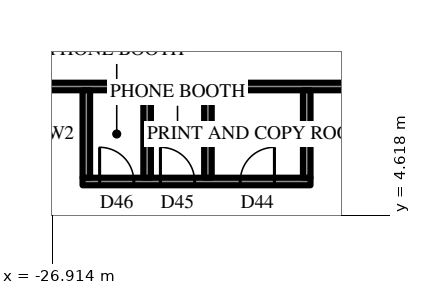
"""IFC4 building model, lengths in metres.
Left out: names, types, materials, properties, quantities, classifications, styles, units other than length and angle.
Written with IfcOpenShell. Run it as: python <this file> out.ifc"""

import sys

from ifc_helpers import new_model, si_unit, direction, frame, frame_2d, origin, place, context, subcontext, project, spatial, rectangle, extrude, element, fill, save


model = new_model("IFC4")
c1 = context("Model", 3, precision=1e-05, world=origin(), true_north=direction((0.0, 1.0)))
c2 = subcontext(c1, "Body", "Model", "MODEL_VIEW")
j1 = project(units=[si_unit("LENGTHUNIT", "METRE"), si_unit("PLANEANGLEUNIT", "RADIAN")], contexts=[c1])
p1 = place(None, origin())
s1 = spatial("IfcSite", under=j1, at=p1, CompositionType="ELEMENT")
p2 = place(p1, origin())
s2 = spatial("IfcBuilding", under=s1, at=p2, CompositionType="ELEMENT")
p3 = place(p2, frame((0.0, 0.0, 127.9)))
s3 = spatial("IfcBuildingStorey", under=s2, at=p3, CompositionType="ELEMENT", Elevation=127.9)
p4 = place(p3, frame((-18.6, 8.0, 0.0), z_axis=(0.0, 0.0, 1.0), x_axis=(-1.0, 0.0, 0.0)))
e1 = element("IfcWall", 1, at=p4, inside=s3, PredefinedType="PARTITIONING", context=c2, shape_type="SweptSolid", body=[
    extrude(rectangle(XDim=12.9, YDim=0.2, at=frame_2d((6.45, 0.0))), origin(), (0.0, 0.0, 1.0), 4.0),
])
p5 = place(p3, frame((-20.115, 5.5, 0.0), z_axis=(0.0, 0.0, 1.0), x_axis=(-1.0, 0.0, 0.0)))
e2 = element("IfcWall", 2, at=p5, inside=s3, PredefinedType="PARTITIONING", context=c2, shape_type="SweptSolid", body=[
    extrude(rectangle(XDim=6.0, YDim=0.2, at=frame_2d((3.0, 0.0))), origin(), (0.0, 0.0, 1.0), 4.0),
])
p6 = place(p5, frame((0.95, 0.0, 0.0)))
e3 = element("IfcOpeningElement", 3, at=p6, cuts=e2, PredefinedType="OPENING", context=c2, shape_type="SweptSolid", body=[
    extrude(rectangle(XDim=0.9, YDim=2.2, at=frame_2d((0.45, 1.1))), frame((0.0, 0.11, 0.0), z_axis=(0.0, -1.0, 0.0), x_axis=(1.0, 0.0, 0.0)), (0.0, 0.0, 1.0), 0.22),
])
p7 = place(p5, frame((3.05, 0.0, 0.0)))
e4 = element("IfcOpeningElement", 4, at=p7, cuts=e2, PredefinedType="OPENING", context=c2, shape_type="SweptSolid", body=[
    extrude(rectangle(XDim=0.9, YDim=2.2, at=frame_2d((0.45, 1.1))), frame((0.0, 0.11, 0.0), z_axis=(0.0, -1.0, 0.0), x_axis=(1.0, 0.0, 0.0)), (0.0, 0.0, 1.0), 0.22),
])
p8 = place(p5, frame((4.65, 0.0, 0.0)))
e5 = element("IfcOpeningElement", 5, at=p8, cuts=e2, PredefinedType="OPENING", context=c2, shape_type="SweptSolid", body=[
    extrude(rectangle(XDim=0.9, YDim=2.2, at=frame_2d((0.45, 1.1))), frame((0.0, 0.11, 0.0), z_axis=(0.0, -1.0, 0.0), x_axis=(1.0, 0.0, 0.0)), (0.0, 0.0, 1.0), 0.22),
])
for number, where, z_axis, x_axis in (
    (6, (-20.215, 7.9, 0.0), (0.0, 0.0, 1.0), (0.0, -1.0, 0.0)),
    (7, (-22.815, 7.9, 0.0), (0.0, 0.0, 1.0), (0.0, -1.0, 0.0)),
    (8, (-24.415, 7.9, 0.0), (0.0, 0.0, 1.0), (0.0, -1.0, 0.0)),
    (9, (-26.015, 7.9, 0.0), (0.0, 0.0, 1.0), (0.0, -1.0, 0.0)),
):
    element("IfcWall", number, at=place(p3, frame(where, z_axis=z_axis, x_axis=x_axis)), inside=s3, PredefinedType="PARTITIONING", context=c2, shape_type="SweptSolid", body=[
        extrude(rectangle(XDim=2.3, YDim=0.2, at=frame_2d((1.15, 0.0))), origin(), (0.0, 0.0, 1.0), 4.0),
    ])
p9 = place(p6, frame((0.9, 0.0, 0.0), z_axis=(0.0, 0.0, 1.0), x_axis=(-1.0, 0.0, 0.0)))
e10 = element("IfcDoor", 10, at=p9, inside=s3, OperationType="SINGLE_SWING_LEFT", PredefinedType="DOOR", context=c2, shape_type="SweptSolid", body=[
    extrude(rectangle(XDim=0.9, YDim=2.2, at=frame_2d((0.45, 1.1))), frame((0.0, 0.025, 0.0), z_axis=(0.0, -1.0, 0.0), x_axis=(1.0, 0.0, 0.0)), (0.0, 0.0, 1.0), 0.05),
])
fill(e3, e10)
p10 = place(p7, frame((0.9, 0.0, 0.0), z_axis=(0.0, 0.0, 1.0), x_axis=(-1.0, 0.0, 0.0)))
e11 = element("IfcDoor", 11, at=p10, inside=s3, OperationType="SINGLE_SWING_RIGHT", PredefinedType="DOOR", context=c2, shape_type="SweptSolid", body=[
    extrude(rectangle(XDim=0.9, YDim=2.2, at=frame_2d((0.45, 1.1))), frame((0.0, 0.025, 0.0), z_axis=(0.0, -1.0, 0.0), x_axis=(1.0, 0.0, 0.0)), (0.0, 0.0, 1.0), 0.05),
])
fill(e4, e11)
p11 = place(p8, frame((0.9, 0.0, 0.0), z_axis=(0.0, 0.0, 1.0), x_axis=(-1.0, 0.0, 0.0)))
e12 = element("IfcDoor", 12, at=p11, inside=s3, OperationType="SINGLE_SWING_RIGHT", PredefinedType="DOOR", context=c2, shape_type="SweptSolid", body=[
    extrude(rectangle(XDim=0.9, YDim=2.2, at=frame_2d((0.45, 1.1))), frame((0.0, 0.025, 0.0), z_axis=(0.0, -1.0, 0.0), x_axis=(1.0, 0.0, 0.0)), (0.0, 0.0, 1.0), 0.05),
])
fill(e5, e12)
save(model, sys.argv[1])
